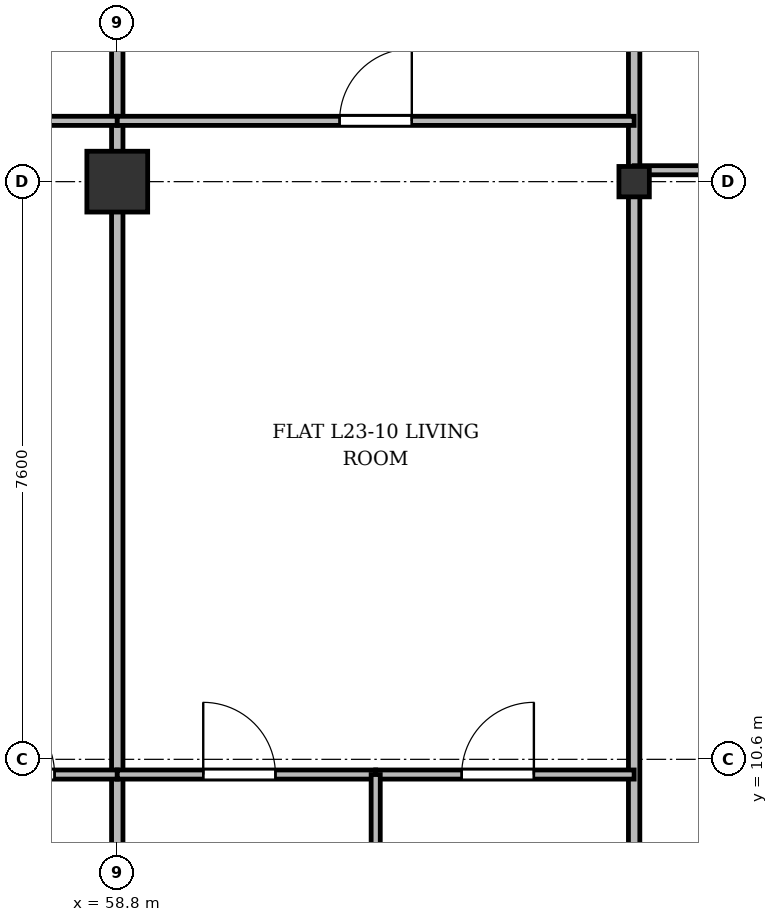
"""IFC4 building model, lengths in metres.
Left out: names, types, materials, properties, quantities, classifications, styles, units other than length and angle.
Written with IfcOpenShell. Run it as: python <this file> out.ifc"""

import sys

from ifc_helpers import new_model, si_unit, direction, frame, frame_2d, origin, origin_2d, place, context, subcontext, project, spatial, rectangle, i_section, extrude, source, transform, mapped, element, fill, save


model = new_model("IFC4")
c1 = context("Model", 3, precision=1e-05, world=origin(), true_north=direction((0.0, 1.0)))
c2 = subcontext(c1, "Body", "Model", "MODEL_VIEW")
j1 = project(units=[si_unit("LENGTHUNIT", "METRE"), si_unit("PLANEANGLEUNIT", "RADIAN")], contexts=[c1])
p1 = place(None, origin())
s1 = spatial("IfcSite", under=j1, at=p1, CompositionType="ELEMENT")
p2 = place(p1, origin())
s2 = spatial("IfcBuilding", under=s1, at=p2, CompositionType="ELEMENT")
p3 = place(p2, frame((0.0, 0.0, 92.5)))
s3 = spatial("IfcBuildingStorey", under=s2, at=p3, CompositionType="ELEMENT", Elevation=92.5)
m1 = source(origin(), c2, "Body", "SweptSolid", [
    extrude(rectangle(XDim=0.8, YDim=0.8, at=origin_2d()), origin(), (0.0, 0.0, 1.0), 3.6),
])
p4 = place(p3, frame((58.8, 18.2, 0.0), z_axis=(0.0, 0.0, 1.0), x_axis=(1.0, 0.0, 0.0)))
e1 = element("IfcColumn", 1, at=p4, inside=s3, PredefinedType="COLUMN", context=c2, shape_type="MappedRepresentation", body=[
    mapped(m1, transform((0.0, 0.0, 0.0), x_axis=(1.0, 0.0, 0.0), y_axis=(0.0, 1.0, 0.0), z_axis=(0.0, 0.0, 1.0), scale=1.0)),
])
m2 = source(origin(), c2, "Body", "SweptSolid", [
    extrude(i_section(OverallWidth=0.4, OverallDepth=0.4, WebThickness=0.022, FlangeThickness=0.035, at=origin_2d()), origin(), (0.0, 0.0, 1.0), 3.6),
])
p5 = place(p3, frame((65.6, 18.2, 0.0), z_axis=(0.0, 0.0, 1.0), x_axis=(1.0, 0.0, 0.0)))
e2 = element("IfcColumn", 2, at=p5, inside=s3, PredefinedType="COLUMN", context=c2, shape_type="MappedRepresentation", body=[
    mapped(m2, transform((0.0, 0.0, 0.0), x_axis=(1.0, 0.0, 0.0), y_axis=(0.0, 1.0, 0.0), z_axis=(0.0, 0.0, 1.0), scale=1.0)),
])
for number, where, z_axis, x_axis in (
    (3, (58.8, 3.145, 0.0), (0.0, 0.0, 1.0), (0.0, 1.0, 0.0)),
    (4, (65.6, 3.145, 0.0), (0.0, 0.0, 1.0), (0.0, 1.0, 0.0)),
):
    element("IfcWall", number, at=place(p3, frame(where, z_axis=z_axis, x_axis=x_axis)), inside=s3, PredefinedType="PARTITIONING", context=c2, shape_type="SweptSolid", body=[
        extrude(rectangle(XDim=24.455, YDim=0.15, at=frame_2d((12.228, 0.0))), origin(), (0.0, 0.0, 1.0), 2.84),
    ])
p6 = place(p3, frame((51.0, 19.0, 0.0), z_axis=(0.0, 0.0, 1.0), x_axis=(1.0, 0.0, 0.0)))
e5 = element("IfcWall", 5, at=p6, inside=s3, PredefinedType="PARTITIONING", context=c2, shape_type="SweptSolid", body=[
    extrude(rectangle(XDim=7.8, YDim=0.12, at=frame_2d((3.9, 0.0))), origin(), (0.0, 0.0, 1.0), 2.84),
])
p7 = place(p6, frame((3.333, 0.0, 0.0)))
e6 = element("IfcOpeningElement", 6, at=p7, cuts=e5, PredefinedType="OPENING", context=c2, shape_type="SweptSolid", body=[
    extrude(rectangle(XDim=0.95, YDim=2.15, at=frame_2d((0.475, 1.075))), frame((0.0, 0.07, 0.0), z_axis=(0.0, -1.0, 0.0), x_axis=(1.0, 0.0, 0.0)), (0.0, 0.0, 1.0), 0.14),
])
p8 = place(p3, frame((56.2, 10.4, 0.0), z_axis=(0.0, 0.0, 1.0), x_axis=(1.0, 0.0, 0.0)))
e7 = element("IfcWall", 7, at=p8, inside=s3, PredefinedType="PARTITIONING", context=c2, shape_type="SweptSolid", body=[
    extrude(rectangle(XDim=2.6, YDim=0.12, at=frame_2d((1.3, 0.0))), origin(), (0.0, 0.0, 1.0), 2.84),
])
p9 = place(p8, frame((0.825, 0.0, 0.0)))
e8 = element("IfcOpeningElement", 8, at=p9, cuts=e7, PredefinedType="OPENING", context=c2, shape_type="SweptSolid", body=[
    extrude(rectangle(XDim=0.95, YDim=2.15, at=frame_2d((0.475, 1.075))), frame((0.0, 0.07, 0.0), z_axis=(0.0, -1.0, 0.0), x_axis=(1.0, 0.0, 0.0)), (0.0, 0.0, 1.0), 0.14),
])
p10 = place(p3, frame((58.8, 19.0, 0.0), z_axis=(0.0, 0.0, 1.0), x_axis=(1.0, 0.0, 0.0)))
e9 = element("IfcWall", 9, at=p10, inside=s3, PredefinedType="PARTITIONING", context=c2, shape_type="SweptSolid", body=[
    extrude(rectangle(XDim=6.8, YDim=0.12, at=frame_2d((3.4, 0.0))), origin(), (0.0, 0.0, 1.0), 2.84),
])
p11 = place(p10, frame((2.925, 0.0, 0.0)))
e10 = element("IfcOpeningElement", 10, at=p11, cuts=e9, PredefinedType="OPENING", context=c2, shape_type="SweptSolid", body=[
    extrude(rectangle(XDim=0.95, YDim=2.15, at=frame_2d((0.475, 1.075))), frame((0.0, 0.07, 0.0), z_axis=(0.0, -1.0, 0.0), x_axis=(1.0, 0.0, 0.0)), (0.0, 0.0, 1.0), 0.14),
])
p12 = place(p3, frame((58.8, 10.4, 0.0), z_axis=(0.0, 0.0, 1.0), x_axis=(1.0, 0.0, 0.0)))
e11 = element("IfcWall", 11, at=p12, inside=s3, PredefinedType="PARTITIONING", context=c2, shape_type="SweptSolid", body=[
    extrude(rectangle(XDim=3.4, YDim=0.12, at=frame_2d((1.7, 0.0))), origin(), (0.0, 0.0, 1.0), 2.84),
])
p13 = place(p12, frame((1.131, 0.0, 0.0)))
e12 = element("IfcOpeningElement", 12, at=p13, cuts=e11, PredefinedType="OPENING", context=c2, shape_type="SweptSolid", body=[
    extrude(rectangle(XDim=0.95, YDim=2.15, at=frame_2d((0.475, 1.075))), frame((0.0, 0.07, 0.0), z_axis=(0.0, -1.0, 0.0), x_axis=(1.0, 0.0, 0.0)), (0.0, 0.0, 1.0), 0.14),
])
p14 = place(p3, frame((62.2, 10.4, 0.0), z_axis=(0.0, 0.0, 1.0), x_axis=(1.0, 0.0, 0.0)))
e13 = element("IfcWall", 13, at=p14, inside=s3, PredefinedType="PARTITIONING", context=c2, shape_type="SweptSolid", body=[
    extrude(rectangle(XDim=3.4, YDim=0.12, at=frame_2d((1.7, 0.0))), origin(), (0.0, 0.0, 1.0), 2.84),
])
p15 = place(p14, frame((1.131, 0.0, 0.0)))
e14 = element("IfcOpeningElement", 14, at=p15, cuts=e13, PredefinedType="OPENING", context=c2, shape_type="SweptSolid", body=[
    extrude(rectangle(XDim=0.95, YDim=2.15, at=frame_2d((0.475, 1.075))), frame((0.0, 0.07, 0.0), z_axis=(0.0, -1.0, 0.0), x_axis=(1.0, 0.0, 0.0)), (0.0, 0.0, 1.0), 0.14),
])
p16 = place(p3, frame((62.2, 3.145, 0.0), z_axis=(0.0, 0.0, 1.0), x_axis=(0.0, 1.0, 0.0)))
e15 = element("IfcWall", 15, at=p16, inside=s3, PredefinedType="PARTITIONING", context=c2, shape_type="SweptSolid", body=[
    extrude(rectangle(XDim=7.255, YDim=0.12, at=frame_2d((3.627, 0.0))), origin(), (0.0, 0.0, 1.0), 2.752),
])
p17 = place(p3, frame((65.6, 18.35, 0.0), z_axis=(0.0, 0.0, 1.0), x_axis=(1.0, 0.0, 0.0)))
e16 = element("IfcWall", 16, at=p17, inside=s3, PredefinedType="PARTITIONING", context=c2, shape_type="SweptSolid", body=[
    extrude(rectangle(XDim=4.04, YDim=0.12, at=frame_2d((2.02, 0.0))), origin(), (0.0, 0.0, 1.0), 2.752),
])
p18 = place(p17, frame((1.545, 0.0, 0.0)))
e17 = element("IfcOpeningElement", 17, at=p18, cuts=e16, PredefinedType="OPENING", context=c2, shape_type="SweptSolid", body=[
    extrude(rectangle(XDim=0.95, YDim=2.15, at=frame_2d((0.475, 1.075))), frame((0.0, 0.07, 0.0), z_axis=(0.0, -1.0, 0.0), x_axis=(1.0, 0.0, 0.0)), (0.0, 0.0, 1.0), 0.14),
])
m3 = source(origin(), c2, "Body", "SweptSolid", [
    extrude(rectangle(XDim=0.95, YDim=2.15, at=frame_2d((0.475, 1.075))), frame((0.0, 0.025, 0.0), z_axis=(0.0, -1.0, 0.0), x_axis=(1.0, 0.0, 0.0)), (0.0, 0.0, 1.0), 0.05),
])
p19 = place(p9, origin())
e18 = element("IfcDoor", 18, at=p19, inside=s3, OperationType="SINGLE_SWING_LEFT", PredefinedType="DOOR", context=c2, shape_type="MappedRepresentation", body=[
    mapped(m3, transform((0.0, 0.0, 0.0), x_axis=(1.0, 0.0, 0.0), y_axis=(0.0, 1.0, 0.0), z_axis=(0.0, 0.0, 1.0), scale=1.0)),
])
fill(e8, e18)
p20 = place(p11, origin())
e19 = element("IfcDoor", 19, at=p20, inside=s3, OperationType="SINGLE_SWING_RIGHT", PredefinedType="DOOR", context=c2, shape_type="MappedRepresentation", body=[
    mapped(m3, transform((0.0, 0.0, 0.0), x_axis=(1.0, 0.0, 0.0), y_axis=(0.0, 1.0, 0.0), z_axis=(0.0, 0.0, 1.0), scale=1.0)),
])
fill(e10, e19)
p21 = place(p13, origin())
e20 = element("IfcDoor", 20, at=p21, inside=s3, OperationType="SINGLE_SWING_LEFT", PredefinedType="DOOR", context=c2, shape_type="MappedRepresentation", body=[
    mapped(m3, transform((0.0, 0.0, 0.0), x_axis=(1.0, 0.0, 0.0), y_axis=(0.0, 1.0, 0.0), z_axis=(0.0, 0.0, 1.0), scale=1.0)),
])
fill(e12, e20)
p22 = place(p15, origin())
e21 = element("IfcDoor", 21, at=p22, inside=s3, OperationType="SINGLE_SWING_RIGHT", PredefinedType="DOOR", context=c2, shape_type="MappedRepresentation", body=[
    mapped(m3, transform((0.0, 0.0, 0.0), x_axis=(1.0, 0.0, 0.0), y_axis=(0.0, 1.0, 0.0), z_axis=(0.0, 0.0, 1.0), scale=1.0)),
])
fill(e14, e21)
save(model, sys.argv[1])
